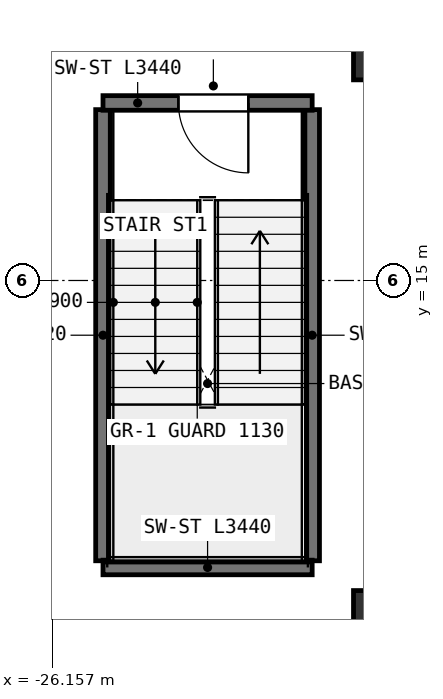
"""IFC4 building model, lengths in metres.
Left out: names, types, materials, properties, quantities, classifications, styles, units other than length and angle.
Written with IfcOpenShell. Run it as: python <this file> out.ifc"""

import sys

from ifc_helpers import new_model, si_unit, direction, frame, frame_2d, origin, origin_2d, place, context, subcontext, project, spatial, rectangle, extrude, element, fill, save


model = new_model("IFC4")
c1 = context("Model", 3, precision=1e-05, world=origin(), true_north=direction((0.0, 1.0)))
c2 = subcontext(c1, "Body", "Model", "MODEL_VIEW")
j1 = project(units=[si_unit("LENGTHUNIT", "METRE"), si_unit("PLANEANGLEUNIT", "RADIAN")], contexts=[c1])
p1 = place(None, origin())
s1 = spatial("IfcSite", under=j1, at=p1, CompositionType="ELEMENT")
p2 = place(p1, origin())
s2 = spatial("IfcBuilding", under=s1, at=p2, CompositionType="ELEMENT")
p3 = place(p2, frame((0.0, 0.0, -9.0)))
s3 = spatial("IfcBuildingStorey", under=s2, at=p3, CompositionType="ELEMENT", Elevation=-9.0)
for number, where, z_axis, x_axis in (
    (1, (-20.8, 9.4, 0.0), (0.0, 0.0, 1.0), (1.0, 0.0, 0.0)),
    (2, (-20.8, 18.8, 0.0), (0.0, 0.0, 1.0), (1.0, 0.0, 0.0)),
):
    element("IfcColumn", number, at=place(p3, frame(where, z_axis=z_axis, x_axis=x_axis)), inside=s3, PredefinedType="COLUMN", context=c2, shape_type="SweptSolid", body=[
        extrude(rectangle(XDim=0.8, YDim=1.0, at=origin_2d()), origin(), (0.0, 0.0, 1.0), 4.5),
    ])
for number, where, z_axis, x_axis in (
    (3, (-25.32, 10.39, 0.0), (0.0, 0.0, 1.0), (0.0, 1.0, 0.0)),
    (4, (-21.88, 10.39, 0.0), (0.0, 0.0, 1.0), (0.0, 1.0, 0.0)),
):
    element("IfcWall", number, at=place(p3, frame(where, z_axis=z_axis, x_axis=x_axis)), inside=s3, PredefinedType="SHEAR", context=c2, shape_type="SweptSolid", body=[
        extrude(rectangle(XDim=7.42, YDim=0.24, at=frame_2d((3.71, 0.0))), origin(), (0.0, 0.0, 1.0), 4.2),
    ])
p4 = place(p3, frame((-25.32, 10.28, 0.0), z_axis=(0.0, 0.0, 1.0), x_axis=(1.0, 0.0, 0.0)))
e5 = element("IfcWall", 5, at=p4, inside=s3, PredefinedType="SHEAR", context=c2, shape_type="SweptSolid", body=[
    extrude(rectangle(XDim=3.44, YDim=0.24, at=frame_2d((1.72, 0.0))), origin(), (0.0, 0.0, 1.0), 4.2),
])
p5 = place(p3, frame((-21.88, 17.92, 0.0), z_axis=(0.0, 0.0, 1.0), x_axis=(-1.0, 0.0, 0.0)))
e6 = element("IfcWall", 6, at=p5, inside=s3, PredefinedType="SHEAR", context=c2, shape_type="SweptSolid", body=[
    extrude(rectangle(XDim=3.44, YDim=0.24, at=frame_2d((1.72, 0.0))), origin(), (0.0, 0.0, 1.0), 4.2),
])
p6 = place(p5, frame((1.05, 0.0, 0.0)))
e7 = element("IfcOpeningElement", 7, at=p6, cuts=e6, PredefinedType="OPENING", context=c2, shape_type="SweptSolid", body=[
    extrude(rectangle(XDim=1.15, YDim=2.15, at=frame_2d((0.575, 1.075))), frame((0.0, 0.13, 0.0), z_axis=(0.0, -1.0, 0.0), x_axis=(1.0, 0.0, 0.0)), (0.0, 0.0, 1.0), 0.26),
])
p7 = place(p6, origin())
e8 = element("IfcDoor", 8, at=p7, inside=s3, OperationType="SINGLE_SWING_LEFT", PredefinedType="DOOR", context=c2, shape_type="SweptSolid", body=[
    extrude(rectangle(XDim=1.15, YDim=2.15, at=frame_2d((0.575, 1.075))), frame((0.0, 0.025, 0.0), z_axis=(0.0, -1.0, 0.0), x_axis=(1.0, 0.0, 0.0)), (0.0, 0.0, 1.0), 0.05),
])
fill(e7, e8)
save(model, sys.argv[1])
